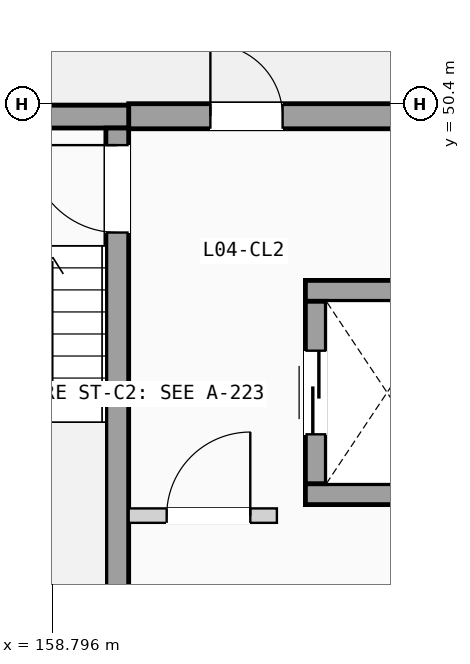
"""IFC4 building model, lengths in metres.
Left out: names, types, materials, properties, quantities, classifications, styles, units other than length and angle.
Written with IfcOpenShell. Run it as: python <this file> out.ifc"""

import sys

from ifc_helpers import new_model, si_unit, direction, frame, frame_2d, origin, place, context, subcontext, project, spatial, rectangle, extrude, element, fill, save


model = new_model("IFC4")
c1 = context("Model", 3, precision=1e-05, world=origin(), true_north=direction((0.0, 1.0)))
c2 = subcontext(c1, "Body", "Model", "MODEL_VIEW")
j1 = project(units=[si_unit("LENGTHUNIT", "METRE"), si_unit("PLANEANGLEUNIT", "RADIAN")], contexts=[c1])
p1 = place(None, origin())
s1 = spatial("IfcSite", under=j1, at=p1, CompositionType="ELEMENT")
p2 = place(p1, origin())
s2 = spatial("IfcBuilding", under=s1, at=p2, CompositionType="ELEMENT")
p3 = place(p2, frame((0.0, 0.0, 15.225)))
s3 = spatial("IfcBuildingStorey", under=s2, at=p3, CompositionType="ELEMENT", Elevation=15.225)
p4 = place(p3, frame((159.8, 50.235, 0.0), z_axis=(0.0, 0.0, 1.0), x_axis=(1.0, 0.0, 0.0)))
e1 = element("IfcWall", 1, at=p4, inside=s3, PredefinedType="SOLIDWALL", context=c2, shape_type="SweptSolid", body=[
    extrude(rectangle(XDim=4.1, YDim=0.33, at=frame_2d((2.05, 0.0))), origin(), (0.0, 0.0, 1.0), 2.89),
])
p5 = place(p4, frame((1.075, 0.0, 0.0)))
e2 = element("IfcOpeningElement", 2, at=p5, cuts=e1, PredefinedType="OPENING", context=c2, shape_type="SweptSolid", body=[
    extrude(rectangle(XDim=0.95, YDim=2.15, at=frame_2d((0.475, 1.075))), frame((0.0, 0.175, 0.0), z_axis=(0.0, -1.0, 0.0), x_axis=(1.0, 0.0, 0.0)), (0.0, 0.0, 1.0), 0.35),
])
p6 = place(p3, frame((156.2, 50.23, 0.0), z_axis=(0.0, 0.0, 1.0), x_axis=(1.0, 0.0, 0.0)))
e3 = element("IfcWall", 3, at=p6, inside=s3, PredefinedType="SHEAR", context=c2, shape_type="SweptSolid", body=[
    extrude(rectangle(XDim=3.6, YDim=0.3, at=frame_2d((1.8, 0.0))), origin(), (0.0, 0.0, 1.0), 2.89),
])
p7 = place(p3, frame((159.65, 43.08, 0.0), z_axis=(0.0, 0.0, 1.0), x_axis=(0.0, 1.0, 0.0)))
e4 = element("IfcWall", 4, at=p7, inside=s3, PredefinedType="SHEAR", context=c2, shape_type="SweptSolid", body=[
    extrude(rectangle(XDim=7.0, YDim=0.3, at=frame_2d((3.5, 0.0))), origin(), (0.0, 0.0, 1.0), 2.89),
])
p8 = place(p7, frame((5.625, 0.0, 0.0)))
e5 = element("IfcOpeningElement", 5, at=p8, cuts=e4, PredefinedType="OPENING", context=c2, shape_type="SweptSolid", body=[
    extrude(rectangle(XDim=1.15, YDim=2.12, at=frame_2d((0.575, 1.06))), frame((0.0, 0.16, 0.0), z_axis=(0.0, -1.0, 0.0), x_axis=(1.0, 0.0, 0.0)), (0.0, 0.0, 1.0), 0.32),
])
for number, where, z_axis, x_axis in (
    (6, (162.125, 45.262, 0.0), (0.0, 0.0, 1.0), (1.0, 0.0, 0.0)),
    (7, (162.125, 47.938, 0.0), (0.0, 0.0, 1.0), (1.0, 0.0, 0.0)),
):
    element("IfcWall", number, at=place(p3, frame(where, z_axis=z_axis, x_axis=x_axis)), inside=s3, PredefinedType="SHEAR", context=c2, shape_type="SweptSolid", body=[
        extrude(rectangle(XDim=2.15, YDim=0.275, at=frame_2d((1.075, 0.0))), origin(), (0.0, 0.0, 1.0), 2.89),
    ])
p9 = place(p3, frame((162.262, 45.4, 0.0), z_axis=(0.0, 0.0, 1.0), x_axis=(0.0, 1.0, 0.0)))
e8 = element("IfcWall", 8, at=p9, inside=s3, PredefinedType="SHEAR", context=c2, shape_type="SweptSolid", body=[
    extrude(rectangle(XDim=2.4, YDim=0.275, at=frame_2d((1.2, 0.0))), origin(), (0.0, 0.0, 1.0), 2.89),
])
p10 = place(p9, frame((0.65, 0.0, 0.0)))
e9 = element("IfcOpeningElement", 9, at=p10, cuts=e8, PredefinedType="OPENING", context=c2, shape_type="SweptSolid", body=[
    extrude(rectangle(XDim=1.1, YDim=2.15, at=frame_2d((0.55, 1.075))), frame((0.0, 0.147, 0.0), z_axis=(0.0, -1.0, 0.0), x_axis=(1.0, 0.0, 0.0)), (0.0, 0.0, 1.0), 0.295),
])
p11 = place(p3, frame((159.8, 44.98, 0.0), z_axis=(0.0, 0.0, 1.0), x_axis=(1.0, 0.0, 0.0)))
e10 = element("IfcWall", 10, at=p11, inside=s3, PredefinedType="PARTITIONING", context=c2, shape_type="SweptSolid", body=[
    extrude(rectangle(XDim=1.95, YDim=0.19, at=frame_2d((0.975, 0.0))), origin(), (0.0, 0.0, 1.0), 2.87),
])
p12 = place(p11, frame((0.5, 0.0, 0.0)))
e11 = element("IfcOpeningElement", 11, at=p12, cuts=e10, PredefinedType="OPENING", context=c2, shape_type="SweptSolid", body=[
    extrude(rectangle(XDim=1.1, YDim=2.12, at=frame_2d((0.55, 1.06))), frame((0.0, 0.105, 0.0), z_axis=(0.0, -1.0, 0.0), x_axis=(1.0, 0.0, 0.0)), (0.0, 0.0, 1.0), 0.21),
])
p13 = place(p5, origin())
e12 = element("IfcDoor", 12, at=p13, inside=s3, OperationType="SINGLE_SWING_LEFT", PredefinedType="DOOR", context=c2, shape_type="SweptSolid", body=[
    extrude(rectangle(XDim=0.95, YDim=2.15, at=frame_2d((0.475, 1.075))), frame((0.0, 0.025, 0.0), z_axis=(0.0, -1.0, 0.0), x_axis=(1.0, 0.0, 0.0)), (0.0, 0.0, 1.0), 0.05),
])
fill(e2, e12)
p14 = place(p8, origin())
e13 = element("IfcDoor", 13, at=p14, inside=s3, OperationType="SINGLE_SWING_RIGHT", PredefinedType="DOOR", context=c2, shape_type="SweptSolid", body=[
    extrude(rectangle(XDim=1.15, YDim=2.12, at=frame_2d((0.575, 1.06))), frame((0.0, 0.025, 0.0), z_axis=(0.0, -1.0, 0.0), x_axis=(1.0, 0.0, 0.0)), (0.0, 0.0, 1.0), 0.05),
])
fill(e5, e13)
p15 = place(p10, origin())
e14 = element("IfcDoor", 14, at=p15, inside=s3, OperationType="SLIDING_TO_LEFT", PredefinedType="DOOR", context=c2, shape_type="SweptSolid", body=[
    extrude(rectangle(XDim=1.1, YDim=2.15, at=frame_2d((0.55, 1.075))), frame((0.0, 0.025, 0.0), z_axis=(0.0, -1.0, 0.0), x_axis=(1.0, 0.0, 0.0)), (0.0, 0.0, 1.0), 0.05),
])
fill(e9, e14)
p16 = place(p12, origin())
e15 = element("IfcDoor", 15, at=p16, inside=s3, OperationType="SINGLE_SWING_RIGHT", PredefinedType="DOOR", context=c2, shape_type="SweptSolid", body=[
    extrude(rectangle(XDim=1.1, YDim=2.12, at=frame_2d((0.55, 1.06))), frame((0.0, 0.025, 0.0), z_axis=(0.0, -1.0, 0.0), x_axis=(1.0, 0.0, 0.0)), (0.0, 0.0, 1.0), 0.05),
])
fill(e11, e15)
save(model, sys.argv[1])
